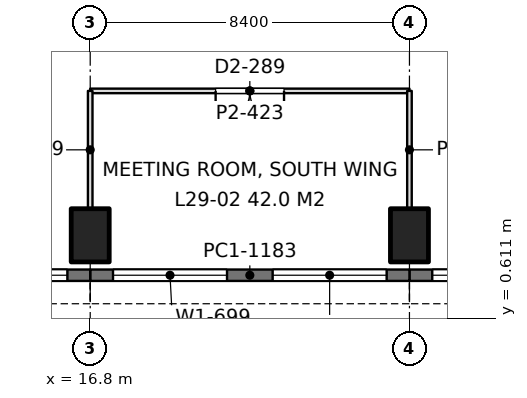
"""IFC4 building model, lengths in metres.
Left out: names, types, materials, properties, quantities, classifications, styles, units other than length and angle.
Written with IfcOpenShell. Run it as: python <this file> out.ifc"""

import sys

from ifc_helpers import new_model, si_unit, direction, frame, frame_2d, origin, origin_2d, place, context, subcontext, project, spatial, rectangle, extrude, element, fill, save


model = new_model("IFC4")
c1 = context("Model", 3, precision=1e-05, world=origin(), true_north=direction((0.0, 1.0)))
c2 = subcontext(c1, "Body", "Model", "MODEL_VIEW")
j1 = project(units=[si_unit("LENGTHUNIT", "METRE"), si_unit("PLANEANGLEUNIT", "RADIAN")], contexts=[c1])
p1 = place(None, origin())
s1 = spatial("IfcSite", under=j1, at=p1, CompositionType="ELEMENT")
p2 = place(p1, origin())
s2 = spatial("IfcBuilding", under=s1, at=p2, CompositionType="ELEMENT")
p3 = place(p2, frame((0.0, 0.0, 130.2)))
s3 = spatial("IfcBuildingStorey", under=s2, at=p3, CompositionType="ELEMENT", Elevation=130.2)
for number, where, z_axis, x_axis in (
    (1, (16.8, 2.8, 0.0), (0.0, 0.0, 1.0), (1.0, 0.0, 0.0)),
    (2, (25.2, 2.8, 0.0), (0.0, 0.0, 1.0), (1.0, 0.0, 0.0)),
):
    element("IfcColumn", number, at=place(p3, frame(where, z_axis=z_axis, x_axis=x_axis)), inside=s3, PredefinedType="COLUMN", context=c2, shape_type="SweptSolid", body=[
        extrude(rectangle(XDim=1.0, YDim=1.4, at=origin_2d()), origin(), (0.0, 0.0, 1.0), 4.2),
    ])
p4 = place(p3, frame((33.6, 1.75, 0.0), z_axis=(0.0, 0.0, 1.0), x_axis=(-1.0, 0.0, 0.0)))
e3 = element("IfcWall", 3, at=p4, inside=s3, PredefinedType="SOLIDWALL", context=c2, shape_type="SweptSolid", body=[
    extrude(rectangle(XDim=8.4, YDim=0.3, at=frame_2d((4.2, 0.0))), origin(), (0.0, 0.0, 1.0), 4.05),
])
p5 = place(p4, frame((0.6, 0.0, 0.9)))
e4 = element("IfcOpeningElement", 4, at=p5, cuts=e3, PredefinedType="OPENING", context=c2, shape_type="SweptSolid", body=[
    extrude(rectangle(XDim=3.0, YDim=1.9, at=frame_2d((1.5, 0.95))), frame((0.0, 0.16, 0.0), z_axis=(0.0, -1.0, 0.0), x_axis=(1.0, 0.0, 0.0)), (0.0, 0.0, 1.0), 0.32),
])
p6 = place(p4, frame((4.8, 0.0, 0.9)))
e5 = element("IfcOpeningElement", 5, at=p6, cuts=e3, PredefinedType="OPENING", context=c2, shape_type="SweptSolid", body=[
    extrude(rectangle(XDim=3.0, YDim=1.9, at=frame_2d((1.5, 0.95))), frame((0.0, 0.16, 0.0), z_axis=(0.0, -1.0, 0.0), x_axis=(1.0, 0.0, 0.0)), (0.0, 0.0, 1.0), 0.32),
])
p7 = place(p3, frame((25.2, 1.75, 0.0), z_axis=(0.0, 0.0, 1.0), x_axis=(-1.0, 0.0, 0.0)))
e6 = element("IfcWall", 6, at=p7, inside=s3, PredefinedType="SOLIDWALL", context=c2, shape_type="SweptSolid", body=[
    extrude(rectangle(XDim=8.4, YDim=0.3, at=frame_2d((4.2, 0.0))), origin(), (0.0, 0.0, 1.0), 4.05),
])
p8 = place(p7, frame((0.6, 0.0, 0.9)))
e7 = element("IfcOpeningElement", 7, at=p8, cuts=e6, PredefinedType="OPENING", context=c2, shape_type="SweptSolid", body=[
    extrude(rectangle(XDim=3.0, YDim=1.9, at=frame_2d((1.5, 0.95))), frame((0.0, 0.16, 0.0), z_axis=(0.0, -1.0, 0.0), x_axis=(1.0, 0.0, 0.0)), (0.0, 0.0, 1.0), 0.32),
])
p9 = place(p7, frame((4.8, 0.0, 0.9)))
e8 = element("IfcOpeningElement", 8, at=p9, cuts=e6, PredefinedType="OPENING", context=c2, shape_type="SweptSolid", body=[
    extrude(rectangle(XDim=3.0, YDim=1.9, at=frame_2d((1.5, 0.95))), frame((0.0, 0.16, 0.0), z_axis=(0.0, -1.0, 0.0), x_axis=(1.0, 0.0, 0.0)), (0.0, 0.0, 1.0), 0.32),
])
p10 = place(p3, frame((16.8, 1.75, 0.0), z_axis=(0.0, 0.0, 1.0), x_axis=(-1.0, 0.0, 0.0)))
e9 = element("IfcWall", 9, at=p10, inside=s3, PredefinedType="SOLIDWALL", context=c2, shape_type="SweptSolid", body=[
    extrude(rectangle(XDim=8.4, YDim=0.3, at=frame_2d((4.2, 0.0))), origin(), (0.0, 0.0, 1.0), 4.05),
])
p11 = place(p10, frame((0.6, 0.0, 0.9)))
e10 = element("IfcOpeningElement", 10, at=p11, cuts=e9, PredefinedType="OPENING", context=c2, shape_type="SweptSolid", body=[
    extrude(rectangle(XDim=3.0, YDim=1.9, at=frame_2d((1.5, 0.95))), frame((0.0, 0.16, 0.0), z_axis=(0.0, -1.0, 0.0), x_axis=(1.0, 0.0, 0.0)), (0.0, 0.0, 1.0), 0.32),
])
p12 = place(p10, frame((4.8, 0.0, 0.9)))
e11 = element("IfcOpeningElement", 11, at=p12, cuts=e9, PredefinedType="OPENING", context=c2, shape_type="SweptSolid", body=[
    extrude(rectangle(XDim=3.0, YDim=1.9, at=frame_2d((1.5, 0.95))), frame((0.0, 0.16, 0.0), z_axis=(0.0, -1.0, 0.0), x_axis=(1.0, 0.0, 0.0)), (0.0, 0.0, 1.0), 0.32),
])
p13 = place(p3, frame((16.8, 6.6, 0.0), z_axis=(0.0, 0.0, 1.0), x_axis=(1.0, 0.0, 0.0)))
e12 = element("IfcWall", 12, at=p13, inside=s3, PredefinedType="PARTITIONING", context=c2, shape_type="SweptSolid", body=[
    extrude(rectangle(XDim=8.4, YDim=0.12, at=frame_2d((4.2, 0.0))), origin(), (0.0, 0.0, 1.0), 3.55),
])
p14 = place(p13, frame((3.3, 0.0, 0.0)))
e13 = element("IfcOpeningElement", 13, at=p14, cuts=e12, PredefinedType="OPENING", context=c2, shape_type="SweptSolid", body=[
    extrude(rectangle(XDim=1.8, YDim=2.2, at=frame_2d((0.9, 1.1))), frame((0.0, 0.07, 0.0), z_axis=(0.0, -1.0, 0.0), x_axis=(1.0, 0.0, 0.0)), (0.0, 0.0, 1.0), 0.14),
])
for number, where, z_axis, x_axis in (
    (14, (16.8, 3.499, 0.0), (0.0, 0.0, 1.0), (0.0, 1.0, 0.0)),
    (15, (25.2, 3.499, 0.0), (0.0, 0.0, 1.0), (0.0, 1.0, 0.0)),
):
    element("IfcWall", number, at=place(p3, frame(where, z_axis=z_axis, x_axis=x_axis)), inside=s3, PredefinedType="PARTITIONING", context=c2, shape_type="SweptSolid", body=[
        extrude(rectangle(XDim=3.101, YDim=0.12, at=frame_2d((1.551, 0.0))), origin(), (0.0, 0.0, 1.0), 3.55),
    ])
p15 = place(p6, origin())
e16 = element("IfcWindow", 16, at=p15, inside=s3, PartitioningType="SINGLE_PANEL", PredefinedType="WINDOW", context=c2, shape_type="SweptSolid", body=[
    extrude(rectangle(XDim=3.0, YDim=1.9, at=frame_2d((1.5, 0.95))), frame((0.0, 0.03, 0.0), z_axis=(0.0, -1.0, 0.0), x_axis=(1.0, 0.0, 0.0)), (0.0, 0.0, 1.0), 0.06),
])
fill(e5, e16)
p16 = place(p8, origin())
e17 = element("IfcWindow", 17, at=p16, inside=s3, PartitioningType="SINGLE_PANEL", PredefinedType="WINDOW", context=c2, shape_type="SweptSolid", body=[
    extrude(rectangle(XDim=3.0, YDim=1.9, at=frame_2d((1.5, 0.95))), frame((0.0, 0.03, 0.0), z_axis=(0.0, -1.0, 0.0), x_axis=(1.0, 0.0, 0.0)), (0.0, 0.0, 1.0), 0.06),
])
fill(e7, e17)
p17 = place(p9, origin())
e18 = element("IfcWindow", 18, at=p17, inside=s3, PartitioningType="SINGLE_PANEL", PredefinedType="WINDOW", context=c2, shape_type="SweptSolid", body=[
    extrude(rectangle(XDim=3.0, YDim=1.9, at=frame_2d((1.5, 0.95))), frame((0.0, 0.03, 0.0), z_axis=(0.0, -1.0, 0.0), x_axis=(1.0, 0.0, 0.0)), (0.0, 0.0, 1.0), 0.06),
])
fill(e8, e18)
p18 = place(p11, origin())
e19 = element("IfcWindow", 19, at=p18, inside=s3, PartitioningType="SINGLE_PANEL", PredefinedType="WINDOW", context=c2, shape_type="SweptSolid", body=[
    extrude(rectangle(XDim=3.0, YDim=1.9, at=frame_2d((1.5, 0.95))), frame((0.0, 0.03, 0.0), z_axis=(0.0, -1.0, 0.0), x_axis=(1.0, 0.0, 0.0)), (0.0, 0.0, 1.0), 0.06),
])
fill(e10, e19)
p19 = place(p14, frame((1.8, 0.0, 0.0), z_axis=(0.0, 0.0, 1.0), x_axis=(-1.0, 0.0, 0.0)))
e20 = element("IfcDoor", 20, at=p19, inside=s3, OperationType="DOUBLE_DOOR_SINGLE_SWING", PredefinedType="DOOR", context=c2, shape_type="SweptSolid", body=[
    extrude(rectangle(XDim=1.8, YDim=2.2, at=frame_2d((0.9, 1.1))), frame((0.0, 0.025, 0.0), z_axis=(0.0, -1.0, 0.0), x_axis=(1.0, 0.0, 0.0)), (0.0, 0.0, 1.0), 0.05),
])
fill(e13, e20)
save(model, sys.argv[1])
